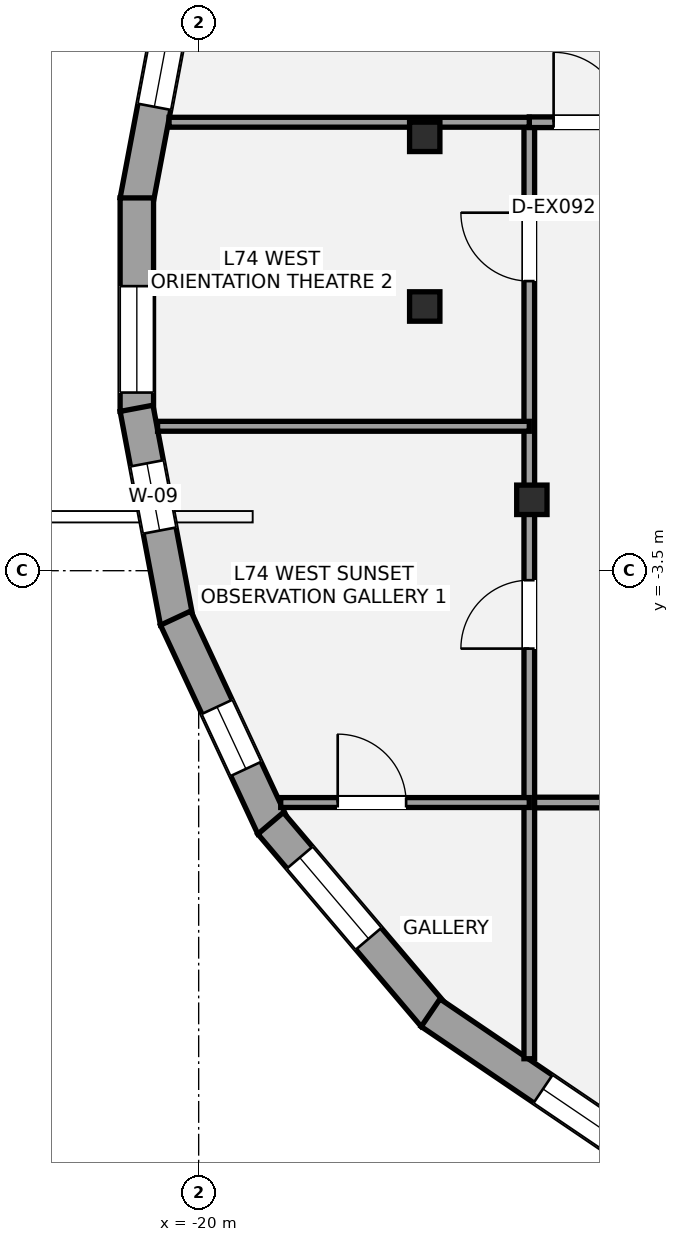
"""IFC4 building model, lengths in metres.
Left out: names, types, materials, properties, quantities, classifications, styles, units other than length and angle.
Written with IfcOpenShell. Run it as: python <this file> out.ifc"""

import sys

from ifc_helpers import new_model, si_unit, direction, frame, frame_2d, origin, origin_2d, place, context, subcontext, project, spatial, rectangle, i_section, extrude, element, fill, save


model = new_model("IFC4")
c1 = context("Model", 3, precision=1e-05, world=origin(), true_north=direction((0.0, 1.0)))
c2 = subcontext(c1, "Body", "Model", "MODEL_VIEW")
j1 = project(units=[si_unit("LENGTHUNIT", "METRE"), si_unit("PLANEANGLEUNIT", "RADIAN")], contexts=[c1])
p1 = place(None, origin())
s1 = spatial("IfcSite", under=j1, at=p1, CompositionType="ELEMENT")
p2 = place(p1, origin())
s2 = spatial("IfcBuilding", under=s1, at=p2, CompositionType="ELEMENT")
p3 = place(p2, frame((0.0, 0.0, 260.4)))
s3 = spatial("IfcBuildingStorey", under=s2, at=p3, CompositionType="ELEMENT", Elevation=260.4)
for number, where, z_axis, x_axis in (
    (1, (-17.026, 2.208, 0.0), (0.0, 0.0, 1.0), (1.0, 0.0, 0.0)),
    (2, (-17.026, -0.024, 0.0), (0.0, 0.0, 1.0), (1.0, 0.0, 0.0)),
    (3, (-15.616, -2.567, 0.0), (0.0, 0.0, 1.0), (1.0, 0.0, 0.0)),
):
    element("IfcColumn", number, at=place(p3, frame(where, z_axis=z_axis, x_axis=x_axis)), inside=s3, PredefinedType="COLUMN", context=c2, shape_type="SweptSolid", body=[
        extrude(i_section(OverallWidth=0.399, OverallDepth=0.387, WebThickness=0.021, FlangeThickness=0.033, at=origin_2d()), origin(), (0.0, 0.0, 1.0), 4.4),
    ])
p4 = place(p3, frame((-20.817, 1.364, 0.0), z_axis=(0.0, 0.0, 1.0), x_axis=(0.185555519657, 0.982633781795, 0.0)))
e4 = element("IfcWall", 4, at=p4, inside=s3, PredefinedType="STANDARD", context=c2, shape_type="SweptSolid", body=[
    extrude(rectangle(XDim=2.862, YDim=0.44, at=frame_2d((1.431, 0.0))), origin(), (0.0, 0.0, 1.0), 3.546),
])
p5 = place(p4, frame((1.262, 0.0, 0.58)))
e5 = element("IfcOpeningElement", 5, at=p5, cuts=e4, PredefinedType="OPENING", context=c2, shape_type="SweptSolid", body=[
    extrude(rectangle(XDim=1.4, YDim=1.55, at=frame_2d((0.7, 0.775))), frame((0.0, 0.23, 0.0), z_axis=(0.0, -1.0, 0.0), x_axis=(1.0, 0.0, 0.0)), (0.0, 0.0, 1.0), 0.46),
])
p6 = place(p3, frame((-20.814, -1.404, 0.0), z_axis=(0.0, 0.0, 1.0), x_axis=(0.0, 1.0, 0.0)))
e6 = element("IfcWall", 6, at=p6, inside=s3, PredefinedType="STANDARD", context=c2, shape_type="SweptSolid", body=[
    extrude(rectangle(XDim=2.809, YDim=0.44, at=frame_2d((1.404, 0.0))), origin(), (0.0, 0.0, 1.0), 3.546),
])
p7 = place(p6, frame((0.248, 0.0, 0.85)))
e7 = element("IfcOpeningElement", 7, at=p7, cuts=e6, PredefinedType="OPENING", context=c2, shape_type="SweptSolid", body=[
    extrude(rectangle(XDim=1.4, YDim=1.55, at=frame_2d((0.7, 0.775))), frame((0.0, 0.23, 0.0), z_axis=(0.0, -1.0, 0.0), x_axis=(1.0, 0.0, 0.0)), (0.0, 0.0, 1.0), 0.46),
])
p8 = place(p3, frame((-20.286, -4.176, 0.0), z_axis=(0.0, 0.0, 1.0), x_axis=(-0.185555519657, 0.982633781795, 0.0)))
e8 = element("IfcWall", 8, at=p8, inside=s3, PredefinedType="STANDARD", context=c2, shape_type="SweptSolid", body=[
    extrude(rectangle(XDim=2.862, YDim=0.44, at=frame_2d((1.431, 0.0))), origin(), (0.0, 0.0, 1.0), 3.546),
])
p9 = place(p8, frame((1.225, 0.0, 0.58)))
e9 = element("IfcOpeningElement", 9, at=p9, cuts=e8, PredefinedType="OPENING", context=c2, shape_type="SweptSolid", body=[
    extrude(rectangle(XDim=0.9, YDim=1.35, at=frame_2d((0.45, 0.675))), frame((0.0, 0.23, 0.0), z_axis=(0.0, -1.0, 0.0), x_axis=(1.0, 0.0, 0.0)), (0.0, 0.0, 1.0), 0.46),
])
p10 = place(p3, frame((-19.022, -6.872, 0.0), z_axis=(0.0, 0.0, 1.0), x_axis=(-0.422378607623, 0.906419501016, 0.0)))
e10 = element("IfcWall", 10, at=p10, inside=s3, PredefinedType="STANDARD", context=c2, shape_type="SweptSolid", body=[
    extrude(rectangle(XDim=3.033, YDim=0.44, at=frame_2d((1.517, 0.0))), origin(), (0.0, 0.0, 1.0), 3.546),
])
p11 = place(p10, frame((0.844, 0.0, 0.58)))
e11 = element("IfcOpeningElement", 11, at=p11, cuts=e10, PredefinedType="OPENING", context=c2, shape_type="SweptSolid", body=[
    extrude(rectangle(XDim=0.9, YDim=1.35, at=frame_2d((0.45, 0.675))), frame((0.0, 0.23, 0.0), z_axis=(0.0, -1.0, 0.0), x_axis=(1.0, 0.0, 0.0)), (0.0, 0.0, 1.0), 0.46),
])
p12 = place(p3, frame((-16.904, -9.356, 0.0), z_axis=(0.0, 0.0, 1.0), x_axis=(-0.647061604266, 0.762437722233, 0.0)))
e12 = element("IfcWall", 12, at=p12, inside=s3, PredefinedType="STANDARD", context=c2, shape_type="SweptSolid", body=[
    extrude(rectangle(XDim=3.322, YDim=0.44, at=frame_2d((1.661, 0.0))), origin(), (0.0, 0.0, 1.0), 3.546),
])
p13 = place(p12, frame((1.329, 0.0, 0.58)))
e13 = element("IfcOpeningElement", 13, at=p13, cuts=e12, PredefinedType="OPENING", context=c2, shape_type="SweptSolid", body=[
    extrude(rectangle(XDim=1.4, YDim=1.55, at=frame_2d((0.7, 0.775))), frame((0.0, 0.23, 0.0), z_axis=(0.0, -1.0, 0.0), x_axis=(1.0, 0.0, 0.0)), (0.0, 0.0, 1.0), 0.46),
])
p14 = place(p3, frame((-13.817, -11.439, 0.0), z_axis=(0.0, 0.0, 1.0), x_axis=(-0.827716626187, 0.561146314908, 0.0)))
e14 = element("IfcWall", 14, at=p14, inside=s3, PredefinedType="STANDARD", context=c2, shape_type="SweptSolid", body=[
    extrude(rectangle(XDim=3.783, YDim=0.44, at=frame_2d((1.892, 0.0))), origin(), (0.0, 0.0, 1.0), 3.55),
])
p15 = place(p14, frame((0.597, 0.0, 0.58)))
e15 = element("IfcOpeningElement", 15, at=p15, cuts=e14, PredefinedType="OPENING", context=c2, shape_type="SweptSolid", body=[
    extrude(rectangle(XDim=1.4, YDim=1.55, at=frame_2d((0.7, 0.775))), frame((0.0, 0.23, 0.0), z_axis=(0.0, -1.0, 0.0), x_axis=(1.0, 0.0, 0.0)), (0.0, 0.0, 1.0), 0.46),
])
p16 = place(p3, frame((-15.65, -6.55, 0.0), z_axis=(0.0, 0.0, 1.0), x_axis=(1.0, 0.0, 0.0)))
e16 = element("IfcWall", 16, at=p16, inside=s3, PredefinedType="PARTITIONING", context=c2, shape_type="SweptSolid", body=[
    extrude(rectangle(XDim=31.3, YDim=0.14, at=frame_2d((15.65, 0.0))), origin(), (0.0, 0.0, 1.0), 3.633),
])
p17 = place(p16, frame((3.775, 0.0, 0.0)))
e17 = element("IfcOpeningElement", 17, at=p17, cuts=e16, PredefinedType="OPENING", context=c2, shape_type="SweptSolid", body=[
    extrude(rectangle(XDim=0.9, YDim=2.1, at=frame_2d((0.45, 1.05))), frame((0.0, 0.08, 0.0), z_axis=(0.0, -1.0, 0.0), x_axis=(1.0, 0.0, 0.0)), (0.0, 0.0, 1.0), 0.16),
])
p18 = place(p16, frame((11.6, 0.0, 0.0)))
e18 = element("IfcOpeningElement", 18, at=p18, cuts=e16, PredefinedType="OPENING", context=c2, shape_type="SweptSolid", body=[
    extrude(rectangle(XDim=0.9, YDim=2.1, at=frame_2d((0.45, 1.05))), frame((0.0, 0.08, 0.0), z_axis=(0.0, -1.0, 0.0), x_axis=(1.0, 0.0, 0.0)), (0.0, 0.0, 1.0), 0.16),
])
p19 = place(p16, frame((18.5, 0.0, 0.0)))
e19 = element("IfcOpeningElement", 19, at=p19, cuts=e16, PredefinedType="OPENING", context=c2, shape_type="SweptSolid", body=[
    extrude(rectangle(XDim=1.5, YDim=2.15, at=frame_2d((0.75, 1.075))), frame((0.0, 0.08, 0.0), z_axis=(0.0, -1.0, 0.0), x_axis=(1.0, 0.0, 0.0)), (0.0, 0.0, 1.0), 0.16),
])
p20 = place(p16, frame((26.625, 0.0, 0.0)))
e20 = element("IfcOpeningElement", 20, at=p20, cuts=e16, PredefinedType="OPENING", context=c2, shape_type="SweptSolid", body=[
    extrude(rectangle(XDim=0.9, YDim=2.1, at=frame_2d((0.45, 1.05))), frame((0.0, 0.08, 0.0), z_axis=(0.0, -1.0, 0.0), x_axis=(1.0, 0.0, 0.0)), (0.0, 0.0, 1.0), 0.16),
])
p21 = place(p3, frame((-15.65, -9.921, 0.0), z_axis=(0.0, 0.0, 1.0), x_axis=(0.0, 1.0, 0.0)))
e21 = element("IfcWall", 21, at=p21, inside=s3, PredefinedType="PARTITIONING", context=c2, shape_type="SweptSolid", body=[
    extrude(rectangle(XDim=12.321, YDim=0.14, at=frame_2d((6.16, 0.0))), origin(), (0.0, 0.0, 1.0), 3.567),
])
p22 = place(p21, frame((5.396, 0.0, 0.0)))
e22 = element("IfcOpeningElement", 22, at=p22, cuts=e21, PredefinedType="OPENING", context=c2, shape_type="SweptSolid", body=[
    extrude(rectangle(XDim=0.9, YDim=2.1, at=frame_2d((0.45, 1.05))), frame((0.0, 0.08, 0.0), z_axis=(0.0, -1.0, 0.0), x_axis=(1.0, 0.0, 0.0)), (0.0, 0.0, 1.0), 0.16),
])
p23 = place(p21, frame((10.231, 0.0, 0.0)))
e23 = element("IfcOpeningElement", 23, at=p23, cuts=e21, PredefinedType="OPENING", context=c2, shape_type="SweptSolid", body=[
    extrude(rectangle(XDim=0.9, YDim=2.1, at=frame_2d((0.45, 1.05))), frame((0.0, 0.08, 0.0), z_axis=(0.0, -1.0, 0.0), x_axis=(1.0, 0.0, 0.0)), (0.0, 0.0, 1.0), 0.16),
])
p24 = place(p3, frame((-15.65, 2.4, 0.0), z_axis=(0.0, 0.0, 1.0), x_axis=(1.0, 0.0, 0.0)))
e24 = element("IfcWall", 24, at=p24, inside=s3, PredefinedType="PARTITIONING", context=c2, shape_type="SweptSolid", body=[
    extrude(rectangle(XDim=1.95, YDim=0.14, at=frame_2d((0.975, 0.0))), origin(), (0.0, 0.0, 1.0), 4.18),
])
p25 = place(p24, frame((0.32, 0.0, 0.0)))
e25 = element("IfcOpeningElement", 25, at=p25, cuts=e24, PredefinedType="OPENING", context=c2, shape_type="SweptSolid", body=[
    extrude(rectangle(XDim=0.92, YDim=2.15, at=frame_2d((0.46, 1.075))), frame((0.0, 0.08, 0.0), z_axis=(0.0, -1.0, 0.0), x_axis=(1.0, 0.0, 0.0)), (0.0, 0.0, 1.0), 0.16),
])
p26 = place(p3, frame((-20.39, 2.4, 0.0), z_axis=(0.0, 0.0, 1.0), x_axis=(1.0, 0.0, 0.0)))
e26 = element("IfcWall", 26, at=p26, inside=s3, PredefinedType="PARTITIONING", context=c2, shape_type="SweptSolid", body=[
    extrude(rectangle(XDim=4.74, YDim=0.13, at=frame_2d((2.37, 0.0))), origin(), (0.0, 0.0, 1.0), 3.633),
])
p27 = place(p3, frame((-18.921, -6.55, 0.0), z_axis=(0.0, 0.0, 1.0), x_axis=(1.0, 0.0, 0.0)))
e27 = element("IfcWall", 27, at=p27, inside=s3, PredefinedType="PARTITIONING", context=c2, shape_type="SweptSolid", body=[
    extrude(rectangle(XDim=3.271, YDim=0.13, at=frame_2d((1.635, 0.0))), origin(), (0.0, 0.0, 1.0), 4.18),
])
p28 = place(p27, frame((0.75, 0.0, 0.0)))
e28 = element("IfcOpeningElement", 28, at=p28, cuts=e27, PredefinedType="OPENING", context=c2, shape_type="SweptSolid", body=[
    extrude(rectangle(XDim=0.9, YDim=2.1, at=frame_2d((0.45, 1.05))), frame((0.0, 0.075, 0.0), z_axis=(0.0, -1.0, 0.0), x_axis=(1.0, 0.0, 0.0)), (0.0, 0.0, 1.0), 0.15),
])
p29 = place(p3, frame((-20.541, -1.6, 0.0), z_axis=(0.0, 0.0, 1.0), x_axis=(1.0, 0.0, 0.0)))
e29 = element("IfcWall", 29, at=p29, inside=s3, PredefinedType="PARTITIONING", context=c2, shape_type="SweptSolid", body=[
    extrude(rectangle(XDim=4.891, YDim=0.13, at=frame_2d((2.445, 0.0))), origin(), (0.0, 0.0, 1.0), 4.18),
])
p30 = place(p5, origin())
e30 = element("IfcWindow", 30, at=p30, inside=s3, PartitioningType="SINGLE_PANEL", PredefinedType="WINDOW", context=c2, shape_type="SweptSolid", body=[
    extrude(rectangle(XDim=1.4, YDim=1.55, at=frame_2d((0.7, 0.775))), frame((0.0, -0.01, 0.0), z_axis=(0.0, -1.0, 0.0), x_axis=(1.0, 0.0, 0.0)), (0.0, 0.0, 1.0), 0.06),
])
fill(e5, e30)
p31 = place(p7, origin())
e31 = element("IfcWindow", 31, at=p31, inside=s3, PartitioningType="SINGLE_PANEL", PredefinedType="WINDOW", context=c2, shape_type="SweptSolid", body=[
    extrude(rectangle(XDim=1.4, YDim=1.55, at=frame_2d((0.7, 0.775))), frame((0.0, -0.01, 0.0), z_axis=(0.0, -1.0, 0.0), x_axis=(1.0, 0.0, 0.0)), (0.0, 0.0, 1.0), 0.06),
])
fill(e7, e31)
p32 = place(p9, origin())
e32 = element("IfcWindow", 32, at=p32, inside=s3, PartitioningType="SINGLE_PANEL", PredefinedType="WINDOW", context=c2, shape_type="SweptSolid", body=[
    extrude(rectangle(XDim=0.9, YDim=1.35, at=frame_2d((0.45, 0.675))), frame((0.0, -0.01, 0.0), z_axis=(0.0, -1.0, 0.0), x_axis=(1.0, 0.0, 0.0)), (0.0, 0.0, 1.0), 0.06),
])
fill(e9, e32)
p33 = place(p11, origin())
e33 = element("IfcWindow", 33, at=p33, inside=s3, PartitioningType="SINGLE_PANEL", PredefinedType="WINDOW", context=c2, shape_type="SweptSolid", body=[
    extrude(rectangle(XDim=0.9, YDim=1.35, at=frame_2d((0.45, 0.675))), frame((0.0, -0.01, 0.0), z_axis=(0.0, -1.0, 0.0), x_axis=(1.0, 0.0, 0.0)), (0.0, 0.0, 1.0), 0.06),
])
fill(e11, e33)
p34 = place(p13, origin())
e34 = element("IfcWindow", 34, at=p34, inside=s3, PartitioningType="SINGLE_PANEL", PredefinedType="WINDOW", context=c2, shape_type="SweptSolid", body=[
    extrude(rectangle(XDim=1.4, YDim=1.55, at=frame_2d((0.7, 0.775))), frame((0.0, -0.01, 0.0), z_axis=(0.0, -1.0, 0.0), x_axis=(1.0, 0.0, 0.0)), (0.0, 0.0, 1.0), 0.06),
])
fill(e13, e34)
p35 = place(p15, origin())
e35 = element("IfcWindow", 35, at=p35, inside=s3, PartitioningType="SINGLE_PANEL", PredefinedType="WINDOW", context=c2, shape_type="SweptSolid", body=[
    extrude(rectangle(XDim=1.4, YDim=1.55, at=frame_2d((0.7, 0.775))), frame((0.0, -0.01, 0.0), z_axis=(0.0, -1.0, 0.0), x_axis=(1.0, 0.0, 0.0)), (0.0, 0.0, 1.0), 0.06),
])
fill(e15, e35)
p36 = place(p25, origin())
e36 = element("IfcDoor", 36, at=p36, inside=s3, OperationType="SINGLE_SWING_LEFT", PredefinedType="DOOR", context=c2, shape_type="SweptSolid", body=[
    extrude(rectangle(XDim=0.92, YDim=2.15, at=frame_2d((0.46, 1.075))), frame((0.0, 0.025, 0.0), z_axis=(0.0, -1.0, 0.0), x_axis=(1.0, 0.0, 0.0)), (0.0, 0.0, 1.0), 0.05),
])
fill(e25, e36)
p37 = place(p28, origin())
e37 = element("IfcDoor", 37, at=p37, inside=s3, OperationType="SINGLE_SWING_LEFT", PredefinedType="DOOR", context=c2, shape_type="SweptSolid", body=[
    extrude(rectangle(XDim=0.9, YDim=2.1, at=frame_2d((0.45, 1.05))), frame((0.0, 0.025, 0.0), z_axis=(0.0, -1.0, 0.0), x_axis=(1.0, 0.0, 0.0)), (0.0, 0.0, 1.0), 0.05),
])
fill(e28, e37)
p38 = place(p22, origin())
e38 = element("IfcDoor", 38, at=p38, inside=s3, OperationType="SINGLE_SWING_LEFT", PredefinedType="DOOR", context=c2, shape_type="SweptSolid", body=[
    extrude(rectangle(XDim=0.9, YDim=2.1, at=frame_2d((0.45, 1.05))), frame((0.0, 0.025, 0.0), z_axis=(0.0, -1.0, 0.0), x_axis=(1.0, 0.0, 0.0)), (0.0, 0.0, 1.0), 0.05),
])
fill(e22, e38)
p39 = place(p23, origin())
e39 = element("IfcDoor", 39, at=p39, inside=s3, OperationType="SINGLE_SWING_RIGHT", PredefinedType="DOOR", context=c2, shape_type="SweptSolid", body=[
    extrude(rectangle(XDim=0.9, YDim=2.1, at=frame_2d((0.45, 1.05))), frame((0.0, 0.025, 0.0), z_axis=(0.0, -1.0, 0.0), x_axis=(1.0, 0.0, 0.0)), (0.0, 0.0, 1.0), 0.05),
])
fill(e23, e39)
save(model, sys.argv[1])
